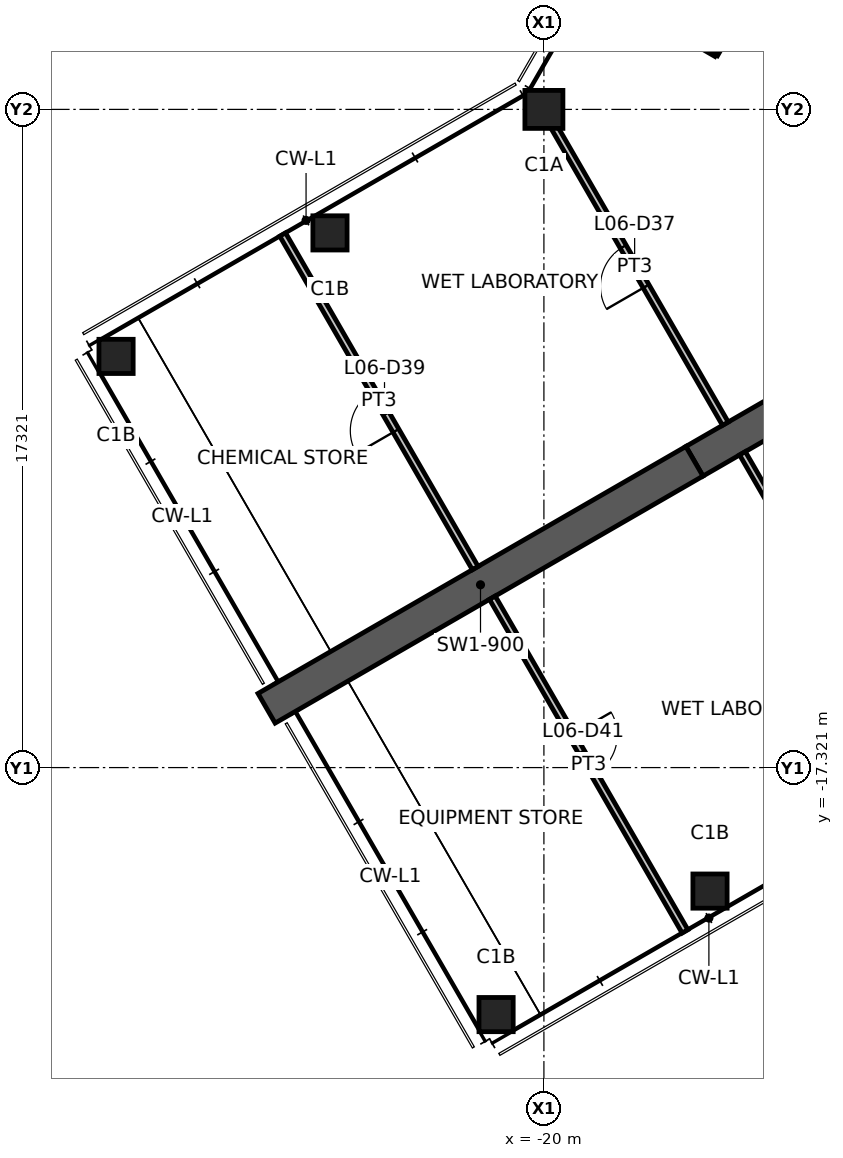
"""IFC4 building model, lengths in metres.
Left out: names, types, materials, properties, quantities, classifications, styles, units other than length and angle.
Written with IfcOpenShell. Run it as: python <this file> out.ifc"""

import sys

from ifc_helpers import new_model, si_unit, direction, frame, frame_2d, origin, origin_2d, place, context, subcontext, project, spatial, rectangle, hollow_rectangle, extrude, element, fill, save


model = new_model("IFC4")
c1 = context("Model", 3, precision=1e-05, world=origin(), true_north=direction((0.0, 1.0)))
c2 = subcontext(c1, "Body", "Model", "MODEL_VIEW")
j1 = project(units=[si_unit("LENGTHUNIT", "METRE"), si_unit("PLANEANGLEUNIT", "RADIAN")], contexts=[c1])
p1 = place(None, origin())
s1 = spatial("IfcSite", under=j1, at=p1, CompositionType="ELEMENT")
p2 = place(p1, origin())
s2 = spatial("IfcBuilding", under=s1, at=p2, CompositionType="ELEMENT")
p3 = place(p2, frame((0.0, 0.0, 22.6)))
s3 = spatial("IfcBuildingStorey", under=s2, at=p3, CompositionType="ELEMENT", Elevation=22.6)
p4 = place(p3, frame((-20.0, 0.0, 0.0), z_axis=(0.0, 0.0, 1.0), x_axis=(1.0, 0.0, 0.0)))
e1 = element("IfcColumn", 1, at=p4, inside=s3, PredefinedType="COLUMN", context=c2, shape_type="SweptSolid", body=[
    extrude(hollow_rectangle(XDim=1.0, YDim=1.0, WallThickness=0.06, at=origin_2d()), origin(), (0.0, 0.0, 1.0), 4.2),
])
for number, where, z_axis, x_axis in (
    (2, (-25.629, -3.25, 0.0), (0.0, 0.0, 1.0), (1.0, 0.0, 0.0)),
    (3, (-31.258, -6.5, 0.0), (0.0, 0.0, 1.0), (1.0, 0.0, 0.0)),
    (4, (-15.629, -20.571, 0.0), (0.0, 0.0, 1.0), (1.0, 0.0, 0.0)),
    (5, (-21.258, -23.821, 0.0), (0.0, 0.0, 1.0), (1.0, 0.0, 0.0)),
):
    element("IfcColumn", number, at=place(p3, frame(where, z_axis=z_axis, x_axis=x_axis)), inside=s3, PredefinedType="COLUMN", context=c2, shape_type="SweptSolid", body=[
        extrude(hollow_rectangle(XDim=0.9, YDim=0.9, WallThickness=0.05, at=origin_2d()), origin(), (0.0, 0.0, 1.0), 4.2),
    ])
p5 = place(p3, frame((-9.461, -5.462, 0.0), z_axis=(0.0, 0.0, 1.0), x_axis=(-0.866019116917, -0.500010889016, 0.0)))
e6 = element("IfcWall", 6, at=p5, inside=s3, PredefinedType="SHEAR", context=c2, shape_type="SweptSolid", body=[
    extrude(rectangle(XDim=7.595, YDim=0.9, at=frame_2d((3.798, 0.0))), origin(), (0.0, 0.0, 1.0), 4.2),
])
p6 = place(p5, frame((0.8, 0.0, 0.0)))
e7 = element("IfcOpeningElement", 7, at=p6, cuts=e6, PredefinedType="OPENING", context=c2, shape_type="SweptSolid", body=[
    extrude(rectangle(XDim=1.0, YDim=2.1, at=frame_2d((0.5, 1.05))), frame((0.0, 0.46, 0.0), z_axis=(0.0, -1.0, 0.0), x_axis=(1.0, 0.0, 0.0)), (0.0, 0.0, 1.0), 0.92),
])
p7 = place(p3, frame((-16.039, -9.26, 0.0), z_axis=(0.0, 0.0, 1.0), x_axis=(-0.866024837091, -0.50000098154, 0.0)))
e8 = element("IfcWall", 8, at=p7, inside=s3, PredefinedType="SHEAR", context=c2, shape_type="SweptSolid", body=[
    extrude(rectangle(XDim=13.0, YDim=0.9, at=frame_2d((6.5, 0.0))), origin(), (0.0, 0.0, 1.0), 4.2),
])
p8 = place(p3, frame((-15.225, -8.271, 0.0), z_axis=(0.0, 0.0, 1.0), x_axis=(-0.499993908199, 0.866028920859, 0.0)))
e9 = element("IfcWall", 9, at=p8, inside=s3, PredefinedType="PARTITIONING", context=c2, shape_type="SweptSolid", body=[
    extrude(rectangle(XDim=9.55, YDim=0.175, at=frame_2d((4.775, 0.0))), origin(), (0.0, 0.0, 1.0), 3.208),
])
p9 = place(p8, frame((4.175, 0.0, 0.0)))
e10 = element("IfcOpeningElement", 10, at=p9, cuts=e9, PredefinedType="OPENING", context=c2, shape_type="SweptSolid", body=[
    extrude(rectangle(XDim=1.2, YDim=2.1, at=frame_2d((0.6, 1.05))), frame((0.0, 0.098, 0.0), z_axis=(0.0, -1.0, 0.0), x_axis=(1.0, 0.0, 0.0)), (0.0, 0.0, 1.0), 0.195),
])
p10 = place(p3, frame((-15.475, 1.437, 0.0), z_axis=(0.0, 0.0, 1.0), x_axis=(-0.866017659399, 0.500013413428, 0.0)))
e11 = element("IfcWall", 11, at=p10, inside=s3, PredefinedType="PARTITIONING", context=c2, shape_type="SweptSolid", body=[
    extrude(rectangle(XDim=3.68, YDim=0.1, at=frame_2d((1.84, 0.0))), origin(), (0.0, 0.0, 1.0), 3.2),
])
p11 = place(p3, frame((-13.852, 4.249, 0.0), z_axis=(0.0, 0.0, 1.0), x_axis=(-0.500013214685, -0.866017774148, 0.0)))
e12 = element("IfcWall", 12, at=p11, inside=s3, PredefinedType="PARTITIONING", context=c2, shape_type="SweptSolid", body=[
    extrude(rectangle(XDim=3.247, YDim=0.1, at=frame_2d((1.623, 0.0))), origin(), (0.0, 0.0, 1.0), 3.2),
])
p12 = place(p3, frame((-21.807, -12.071, 0.0), z_axis=(0.0, 0.0, 1.0), x_axis=(-0.499994227129, 0.866028736727, 0.0)))
e13 = element("IfcWall", 13, at=p12, inside=s3, PredefinedType="PARTITIONING", context=c2, shape_type="SweptSolid", body=[
    extrude(rectangle(XDim=10.135, YDim=0.175, at=frame_2d((5.067, 0.0))), origin(), (0.0, 0.0, 1.0), 4.0),
])
p13 = place(p12, frame((4.175, 0.0, 0.0)))
e14 = element("IfcOpeningElement", 14, at=p13, cuts=e13, PredefinedType="OPENING", context=c2, shape_type="SweptSolid", body=[
    extrude(rectangle(XDim=1.2, YDim=2.1, at=frame_2d((0.6, 1.05))), frame((0.0, 0.098, 0.0), z_axis=(0.0, -1.0, 0.0), x_axis=(1.0, 0.0, 0.0)), (0.0, 0.0, 1.0), 0.195),
])
p14 = place(p3, frame((-14.775, -9.05, 0.0), z_axis=(0.0, 0.0, 1.0), x_axis=(0.499993908199, -0.866028920859, 0.0)))
e15 = element("IfcWall", 15, at=p14, inside=s3, PredefinedType="PARTITIONING", context=c2, shape_type="SweptSolid", body=[
    extrude(rectangle(XDim=9.55, YDim=0.175, at=frame_2d((4.775, 0.0))), origin(), (0.0, 0.0, 1.0), 3.208),
])
p15 = place(p14, frame((4.175, 0.0, 0.0)))
e16 = element("IfcOpeningElement", 16, at=p15, cuts=e15, PredefinedType="OPENING", context=c2, shape_type="SweptSolid", body=[
    extrude(rectangle(XDim=1.2, YDim=2.1, at=frame_2d((0.6, 1.05))), frame((0.0, 0.098, 0.0), z_axis=(0.0, -1.0, 0.0), x_axis=(1.0, 0.0, 0.0)), (0.0, 0.0, 1.0), 0.195),
])
p16 = place(p3, frame((-21.357, -12.85, 0.0), z_axis=(0.0, 0.0, 1.0), x_axis=(0.499987145745, -0.866032825065, 0.0)))
e17 = element("IfcWall", 17, at=p16, inside=s3, PredefinedType="PARTITIONING", context=c2, shape_type="SweptSolid", body=[
    extrude(rectangle(XDim=10.14, YDim=0.175, at=frame_2d((5.07, 0.0))), origin(), (0.0, 0.0, 1.0), 4.0),
])
p17 = place(p16, frame((4.175, 0.0, 0.0)))
e18 = element("IfcOpeningElement", 18, at=p17, cuts=e17, PredefinedType="OPENING", context=c2, shape_type="SweptSolid", body=[
    extrude(rectangle(XDim=1.2, YDim=2.1, at=frame_2d((0.6, 1.05))), frame((0.0, 0.098, 0.0), z_axis=(0.0, -1.0, 0.0), x_axis=(1.0, 0.0, 0.0)), (0.0, 0.0, 1.0), 0.195),
])
p18 = place(p9, origin())
e19 = element("IfcDoor", 19, at=p18, inside=s3, OperationType="DOUBLE_DOOR_SINGLE_SWING", PredefinedType="DOOR", context=c2, shape_type="SweptSolid", body=[
    extrude(rectangle(XDim=1.2, YDim=2.1, at=frame_2d((0.6, 1.05))), frame((0.0, 0.025, 0.0), z_axis=(0.0, -1.0, 0.0), x_axis=(1.0, 0.0, 0.0)), (0.0, 0.0, 1.0), 0.05),
])
fill(e10, e19)
p19 = place(p13, origin())
e20 = element("IfcDoor", 20, at=p19, inside=s3, OperationType="DOUBLE_DOOR_SINGLE_SWING", PredefinedType="DOOR", context=c2, shape_type="SweptSolid", body=[
    extrude(rectangle(XDim=1.2, YDim=2.1, at=frame_2d((0.6, 1.05))), frame((0.0, 0.025, 0.0), z_axis=(0.0, -1.0, 0.0), x_axis=(1.0, 0.0, 0.0)), (0.0, 0.0, 1.0), 0.05),
])
fill(e14, e20)
p20 = place(p17, origin())
e21 = element("IfcDoor", 21, at=p20, inside=s3, OperationType="DOUBLE_DOOR_SINGLE_SWING", PredefinedType="DOOR", context=c2, shape_type="SweptSolid", body=[
    extrude(rectangle(XDim=1.2, YDim=2.1, at=frame_2d((0.6, 1.05))), frame((0.0, 0.025, 0.0), z_axis=(0.0, -1.0, 0.0), x_axis=(1.0, 0.0, 0.0)), (0.0, 0.0, 1.0), 0.05),
])
fill(e18, e21)
save(model, sys.argv[1])
